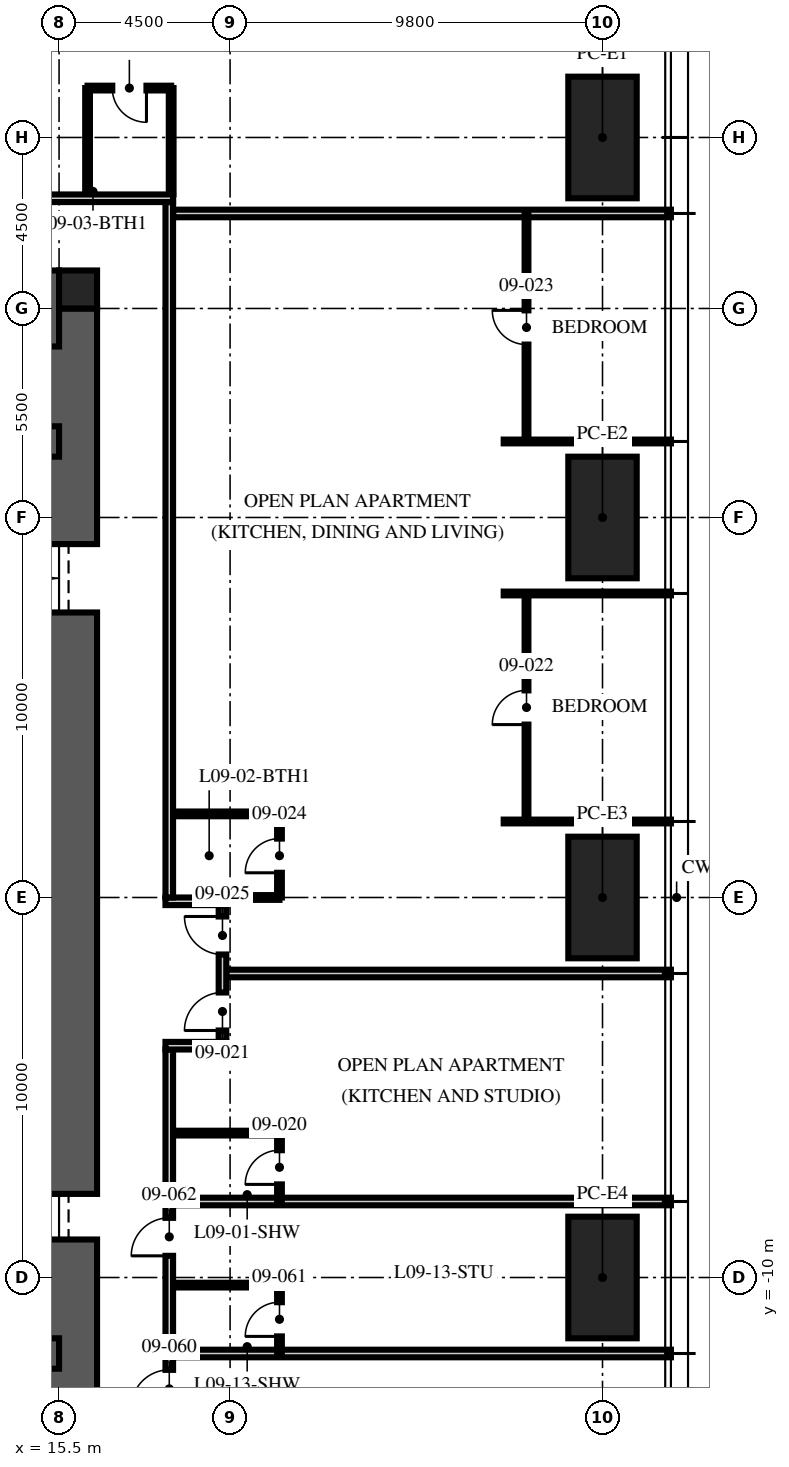
"""IFC4 building model, lengths in metres.
Left out: names, types, materials, properties, quantities, classifications, styles, units other than length and angle.
Written with IfcOpenShell. Run it as: python <this file> out.ifc"""

import sys

from ifc_helpers import new_model, si_unit, direction, frame, frame_2d, origin, origin_2d, place, context, subcontext, project, spatial, rectangle, hollow_rectangle, extrude, element, fill, save


model = new_model("IFC4")
c1 = context("Model", 3, precision=1e-05, world=origin(), true_north=direction((0.0, 1.0)))
c2 = subcontext(c1, "Body", "Model", "MODEL_VIEW")
j1 = project(units=[si_unit("LENGTHUNIT", "METRE"), si_unit("PLANEANGLEUNIT", "RADIAN")], contexts=[c1])
p1 = place(None, origin())
s1 = spatial("IfcSite", under=j1, at=p1, CompositionType="ELEMENT")
p2 = place(p1, origin())
s2 = spatial("IfcBuilding", under=s1, at=p2, CompositionType="ELEMENT")
p3 = place(p2, frame((0.0, 0.0, 39.75)))
s3 = spatial("IfcBuildingStorey", under=s2, at=p3, CompositionType="ELEMENT", Elevation=39.75)
p4 = place(p3, frame((15.5, -15.5, -0.25), z_axis=(0.0, 0.0, 1.0), x_axis=(0.0, 1.0, 0.0)))
e1 = element("IfcWall", 1, at=p4, inside=s3, PredefinedType="SHEAR", context=c2, shape_type="SweptSolid", body=[
    extrude(rectangle(XDim=31.0, YDim=2.0, at=frame_2d((15.5, 0.0))), origin(), (0.0, 0.0, 1.0), 3.75),
])
p5 = place(p4, frame((6.5, 0.0, 0.25)))
e2 = element("IfcOpeningElement", 2, at=p5, cuts=e1, PredefinedType="OPENING", context=c2, shape_type="SweptSolid", body=[
    extrude(rectangle(XDim=1.2, YDim=2.1, at=frame_2d((0.6, 1.05))), frame((0.0, 1.01, 0.0), z_axis=(0.0, -1.0, 0.0), x_axis=(1.0, 0.0, 0.0)), (0.0, 0.0, 1.0), 2.02),
])
p6 = place(p4, frame((23.0, 0.0, 0.25)))
e3 = element("IfcOpeningElement", 3, at=p6, cuts=e1, PredefinedType="OPENING", context=c2, shape_type="SweptSolid", body=[
    extrude(rectangle(XDim=1.8, YDim=2.1, at=frame_2d((0.9, 1.05))), frame((0.0, 1.01, 0.0), z_axis=(0.0, -1.0, 0.0), x_axis=(1.0, 0.0, 0.0)), (0.0, 0.0, 1.0), 2.02),
])
p7 = place(p3, frame((-15.5, 15.5, -0.25), z_axis=(0.0, 0.0, 1.0), x_axis=(1.0, 0.0, 0.0)))
e4 = element("IfcWall", 4, at=p7, inside=s3, PredefinedType="SHEAR", context=c2, shape_type="SweptSolid", body=[
    extrude(rectangle(XDim=31.0, YDim=2.0, at=frame_2d((15.5, 0.0))), origin(), (0.0, 0.0, 1.0), 3.75),
])
p8 = place(p7, frame((10.4, 0.0, 0.25)))
e5 = element("IfcOpeningElement", 5, at=p8, cuts=e4, PredefinedType="OPENING", context=c2, shape_type="SweptSolid", body=[
    extrude(rectangle(XDim=1.1, YDim=2.1, at=frame_2d((0.55, 1.05))), frame((0.0, 1.01, 0.0), z_axis=(0.0, -1.0, 0.0), x_axis=(1.0, 0.0, 0.0)), (0.0, 0.0, 1.0), 2.02),
])
p9 = place(p7, frame((13.5, 0.0, 0.25)))
e6 = element("IfcOpeningElement", 6, at=p9, cuts=e4, PredefinedType="OPENING", context=c2, shape_type="SweptSolid", body=[
    extrude(rectangle(XDim=1.1, YDim=2.1, at=frame_2d((0.55, 1.05))), frame((0.0, 1.01, 0.0), z_axis=(0.0, -1.0, 0.0), x_axis=(1.0, 0.0, 0.0)), (0.0, 0.0, 1.0), 2.02),
])
p10 = place(p7, frame((16.6, 0.0, 0.25)))
e7 = element("IfcOpeningElement", 7, at=p10, cuts=e4, PredefinedType="OPENING", context=c2, shape_type="SweptSolid", body=[
    extrude(rectangle(XDim=1.1, YDim=2.1, at=frame_2d((0.55, 1.05))), frame((0.0, 1.01, 0.0), z_axis=(0.0, -1.0, 0.0), x_axis=(1.0, 0.0, 0.0)), (0.0, 0.0, 1.0), 2.02),
])
for number, where, z_axis, x_axis in (
    (8, (-15.5, 12.0, -0.25), (0.0, 0.0, 1.0), (1.0, 0.0, 0.0)),
    (9, (-15.5, -12.0, -0.25), (0.0, 0.0, 1.0), (1.0, 0.0, 0.0)),
):
    element("IfcWall", number, at=place(p3, frame(where, z_axis=z_axis, x_axis=x_axis)), inside=s3, PredefinedType="SHEAR", context=c2, shape_type="SweptSolid", body=[
        extrude(rectangle(XDim=31.0, YDim=0.8, at=frame_2d((15.5, 0.0))), origin(), (0.0, 0.0, 1.0), 3.75),
    ])
p11 = place(p3, frame((16.0, 16.0, -0.25), z_axis=(0.0, 0.0, 1.0), x_axis=(1.0, 0.0, 0.0)))
e10 = element("IfcColumn", 10, at=p11, inside=s3, PredefinedType="COLUMN", context=c2, shape_type="SweptSolid", body=[
    extrude(rectangle(XDim=1.0, YDim=1.0, at=origin_2d()), origin(), (0.0, 0.0, 1.0), 3.75),
])
for number, where, z_axis, x_axis in (
    (11, (29.8, 20.0, 0.0), (0.0, 0.0, 1.0), (0.0, 1.0, 0.0)),
    (12, (29.8, 10.0, 0.0), (0.0, 0.0, 1.0), (0.0, 1.0, 0.0)),
    (13, (29.8, 0.0, 0.0), (0.0, 0.0, 1.0), (0.0, 1.0, 0.0)),
    (14, (29.8, -10.0, 0.0), (0.0, 0.0, 1.0), (0.0, 1.0, 0.0)),
):
    element("IfcColumn", number, at=place(p3, frame(where, z_axis=z_axis, x_axis=x_axis)), inside=s3, PredefinedType="COLUMN", context=c2, shape_type="SweptSolid", body=[
        extrude(hollow_rectangle(XDim=3.2, YDim=1.8, WallThickness=0.2, at=origin_2d()), origin(), (0.0, 0.0, 1.0), 3.75),
    ])
p12 = place(p3, frame((18.5, -8.0, 0.0), z_axis=(0.0, 0.0, 1.0), x_axis=(1.0, 0.0, 0.0)))
e15 = element("IfcWall", 15, at=p12, inside=s3, PredefinedType="PARTITIONING", context=c2, shape_type="SweptSolid", body=[
    extrude(rectangle(XDim=13.1, YDim=0.2, at=frame_2d((6.55, 0.0))), origin(), (0.0, 0.0, 1.0), 2.71),
])
p13 = place(p3, frame((19.9, -2.0, 0.0), z_axis=(0.0, 0.0, 1.0), x_axis=(1.0, 0.0, 0.0)))
e16 = element("IfcWall", 16, at=p13, inside=s3, PredefinedType="PARTITIONING", context=c2, shape_type="SweptSolid", body=[
    extrude(rectangle(XDim=11.7, YDim=0.2, at=frame_2d((5.85, 0.0))), origin(), (0.0, 0.0, 1.0), 2.71),
])
for number, where, z_axis, x_axis in (
    (17, (27.2, 2.0, 0.0), (0.0, 0.0, 1.0), (1.0, 0.0, 0.0)),
    (18, (27.2, 8.0, 0.0), (0.0, 0.0, 1.0), (1.0, 0.0, 0.0)),
    (19, (27.2, 12.0, 0.0), (0.0, 0.0, 1.0), (1.0, 0.0, 0.0)),
):
    element("IfcWall", number, at=place(p3, frame(where, z_axis=z_axis, x_axis=x_axis)), inside=s3, PredefinedType="PARTITIONING", context=c2, shape_type="SweptSolid", body=[
        extrude(rectangle(XDim=4.4, YDim=0.1, at=frame_2d((2.2, 0.0))), origin(), (0.0, 0.0, 1.0), 2.71),
    ])
p14 = place(p3, frame((18.5, 18.0, 0.0), z_axis=(0.0, 0.0, 1.0), x_axis=(1.0, 0.0, 0.0)))
e20 = element("IfcWall", 20, at=p14, inside=s3, PredefinedType="PARTITIONING", context=c2, shape_type="SweptSolid", body=[
    extrude(rectangle(XDim=13.1, YDim=0.2, at=frame_2d((6.55, 0.0))), origin(), (0.0, 0.0, 1.0), 2.3),
])
p15 = place(p3, frame((18.5, -12.0, 0.0), z_axis=(0.0, 0.0, 1.0), x_axis=(1.0, 0.0, 0.0)))
e21 = element("IfcWall", 21, at=p15, inside=s3, PredefinedType="PARTITIONING", context=c2, shape_type="SweptSolid", body=[
    extrude(rectangle(XDim=13.1, YDim=0.2, at=frame_2d((6.55, 0.0))), origin(), (0.0, 0.0, 1.0), 2.71),
])
p16 = place(p3, frame((21.3, -8.0, 0.0), z_axis=(0.0, 0.0, 1.0), x_axis=(0.0, 1.0, 0.0)))
e22 = element("IfcWall", 22, at=p16, inside=s3, PredefinedType="PARTITIONING", context=c2, shape_type="SweptSolid", body=[
    extrude(rectangle(XDim=1.8, YDim=0.125, at=frame_2d((0.9, 0.0))), origin(), (0.0, 0.0, 1.0), 3.5),
])
p17 = place(p16, frame((0.45, 0.0, 0.0)))
e23 = element("IfcOpeningElement", 23, at=p17, cuts=e22, PredefinedType="OPENING", context=c2, shape_type="SweptSolid", body=[
    extrude(rectangle(XDim=0.9, YDim=2.1, at=frame_2d((0.45, 1.05))), frame((0.0, 0.073, 0.0), z_axis=(0.0, -1.0, 0.0), x_axis=(1.0, 0.0, 0.0)), (0.0, 0.0, 1.0), 0.145),
])
p18 = place(p3, frame((18.5, -6.2, 0.0), z_axis=(0.0, 0.0, 1.0), x_axis=(1.0, 0.0, 0.0)))
e24 = element("IfcWall", 24, at=p18, inside=s3, PredefinedType="PARTITIONING", context=c2, shape_type="SweptSolid", body=[
    extrude(rectangle(XDim=2.8, YDim=0.125, at=frame_2d((1.4, 0.0))), origin(), (0.0, 0.0, 1.0), 3.5),
])
p19 = place(p3, frame((27.8, 2.0, 0.0), z_axis=(0.0, 0.0, 1.0), x_axis=(0.0, 1.0, 0.0)))
e25 = element("IfcWall", 25, at=p19, inside=s3, PredefinedType="PARTITIONING", context=c2, shape_type="SweptSolid", body=[
    extrude(rectangle(XDim=6.0, YDim=0.1, at=frame_2d((3.0, 0.0))), origin(), (0.0, 0.0, 1.0), 2.61),
])
p20 = place(p19, frame((2.55, 0.0, 0.0)))
e26 = element("IfcOpeningElement", 26, at=p20, cuts=e25, PredefinedType="OPENING", context=c2, shape_type="SweptSolid", body=[
    extrude(rectangle(XDim=0.9, YDim=2.1, at=frame_2d((0.45, 1.05))), frame((0.0, 0.06, 0.0), z_axis=(0.0, -1.0, 0.0), x_axis=(1.0, 0.0, 0.0)), (0.0, 0.0, 1.0), 0.12),
])
p21 = place(p3, frame((27.8, 12.0, 0.0), z_axis=(0.0, 0.0, 1.0), x_axis=(0.0, 1.0, 0.0)))
e27 = element("IfcWall", 27, at=p21, inside=s3, PredefinedType="PARTITIONING", context=c2, shape_type="SweptSolid", body=[
    extrude(rectangle(XDim=6.0, YDim=0.1, at=frame_2d((3.0, 0.0))), origin(), (0.0, 0.0, 1.0), 2.61),
])
p22 = place(p21, frame((2.55, 0.0, 0.0)))
e28 = element("IfcOpeningElement", 28, at=p22, cuts=e27, PredefinedType="OPENING", context=c2, shape_type="SweptSolid", body=[
    extrude(rectangle(XDim=0.9, YDim=2.1, at=frame_2d((0.45, 1.05))), frame((0.0, 0.06, 0.0), z_axis=(0.0, -1.0, 0.0), x_axis=(1.0, 0.0, 0.0)), (0.0, 0.0, 1.0), 0.12),
])
p23 = place(p3, frame((21.3, 0.0, 0.0), z_axis=(0.0, 0.0, 1.0), x_axis=(0.0, 1.0, 0.0)))
e29 = element("IfcWall", 29, at=p23, inside=s3, PredefinedType="PARTITIONING", context=c2, shape_type="SweptSolid", body=[
    extrude(rectangle(XDim=2.2, YDim=0.125, at=frame_2d((1.1, 0.0))), origin(), (0.0, 0.0, 1.0), 2.492),
])
p24 = place(p23, frame((0.65, 0.0, 0.0)))
e30 = element("IfcOpeningElement", 30, at=p24, cuts=e29, PredefinedType="OPENING", context=c2, shape_type="SweptSolid", body=[
    extrude(rectangle(XDim=0.9, YDim=2.1, at=frame_2d((0.45, 1.05))), frame((0.0, 0.073, 0.0), z_axis=(0.0, -1.0, 0.0), x_axis=(1.0, 0.0, 0.0)), (0.0, 0.0, 1.0), 0.145),
])
p25 = place(p3, frame((19.97, 0.0, 0.0), z_axis=(0.0, 0.0, 1.0), x_axis=(1.0, 0.0, 0.0)))
e31 = element("IfcWall", 31, at=p25, inside=s3, PredefinedType="PARTITIONING", context=c2, shape_type="SweptSolid", body=[
    extrude(rectangle(XDim=1.33, YDim=0.125, at=frame_2d((0.665, 0.0))), origin(), (0.0, 0.0, 1.0), 2.492),
])
p26 = place(p3, frame((18.5, 2.2, 0.0), z_axis=(0.0, 0.0, 1.0), x_axis=(1.0, 0.0, 0.0)))
e32 = element("IfcWall", 32, at=p26, inside=s3, PredefinedType="PARTITIONING", context=c2, shape_type="SweptSolid", body=[
    extrude(rectangle(XDim=2.8, YDim=0.125, at=frame_2d((1.4, 0.0))), origin(), (0.0, 0.0, 1.0), 3.5),
])
p27 = place(p3, frame((18.45, 21.3, 0.0), z_axis=(0.0, 0.0, 1.0), x_axis=(-1.0, 0.0, 0.0)))
e33 = element("IfcWall", 33, at=p27, inside=s3, PredefinedType="PARTITIONING", context=c2, shape_type="SweptSolid", body=[
    extrude(rectangle(XDim=2.2, YDim=0.125, at=frame_2d((1.1, 0.0))), origin(), (0.0, 0.0, 1.0), 3.5),
])
p28 = place(p27, frame((0.65, 0.0, 0.0)))
e34 = element("IfcOpeningElement", 34, at=p28, cuts=e33, PredefinedType="OPENING", context=c2, shape_type="SweptSolid", body=[
    extrude(rectangle(XDim=0.9, YDim=2.1, at=frame_2d((0.45, 1.05))), frame((0.0, 0.073, 0.0), z_axis=(0.0, -1.0, 0.0), x_axis=(1.0, 0.0, 0.0)), (0.0, 0.0, 1.0), 0.145),
])
p29 = place(p3, frame((18.45, 18.5, 0.0), z_axis=(0.0, 0.0, 1.0), x_axis=(0.0, 1.0, 0.0)))
e35 = element("IfcWall", 35, at=p29, inside=s3, PredefinedType="PARTITIONING", context=c2, shape_type="SweptSolid", body=[
    extrude(rectangle(XDim=2.8, YDim=0.125, at=frame_2d((1.4, 0.0))), origin(), (0.0, 0.0, 1.0), 2.3),
])
p30 = place(p3, frame((16.25, 18.5, 0.0), z_axis=(0.0, 0.0, 1.0), x_axis=(0.0, 1.0, 0.0)))
e36 = element("IfcWall", 36, at=p30, inside=s3, PredefinedType="PARTITIONING", context=c2, shape_type="SweptSolid", body=[
    extrude(rectangle(XDim=2.8, YDim=0.125, at=frame_2d((1.4, 0.0))), origin(), (0.0, 0.0, 1.0), 3.5),
])
p31 = place(p3, frame((21.3, -12.0, 0.0), z_axis=(0.0, 0.0, 1.0), x_axis=(0.0, 1.0, 0.0)))
e37 = element("IfcWall", 37, at=p31, inside=s3, PredefinedType="PARTITIONING", context=c2, shape_type="SweptSolid", body=[
    extrude(rectangle(XDim=1.8, YDim=0.125, at=frame_2d((0.9, 0.0))), origin(), (0.0, 0.0, 1.0), 3.5),
])
p32 = place(p31, frame((0.45, 0.0, 0.0)))
e38 = element("IfcOpeningElement", 38, at=p32, cuts=e37, PredefinedType="OPENING", context=c2, shape_type="SweptSolid", body=[
    extrude(rectangle(XDim=0.9, YDim=2.1, at=frame_2d((0.45, 1.05))), frame((0.0, 0.073, 0.0), z_axis=(0.0, -1.0, 0.0), x_axis=(1.0, 0.0, 0.0)), (0.0, 0.0, 1.0), 0.145),
])
p33 = place(p3, frame((18.5, -10.2, 0.0), z_axis=(0.0, 0.0, 1.0), x_axis=(1.0, 0.0, 0.0)))
e39 = element("IfcWall", 39, at=p33, inside=s3, PredefinedType="PARTITIONING", context=c2, shape_type="SweptSolid", body=[
    extrude(rectangle(XDim=2.8, YDim=0.125, at=frame_2d((1.4, 0.0))), origin(), (0.0, 0.0, 1.0), 2.492),
])
p34 = place(p3, frame((18.4, -18.3, 0.0), z_axis=(0.0, 0.0, 1.0), x_axis=(0.0, 1.0, 0.0)))
e40 = element("IfcWall", 40, at=p34, inside=s3, PredefinedType="PARTITIONING", context=c2, shape_type="SweptSolid", body=[
    extrude(rectangle(XDim=14.3, YDim=0.2, at=frame_2d((7.15, 0.0))), origin(), (0.0, 0.0, 1.0), 2.3),
])
p35 = place(p34, frame((4.87, 0.0, 0.0)))
e41 = element("IfcOpeningElement", 41, at=p35, cuts=e40, PredefinedType="OPENING", context=c2, shape_type="SweptSolid", body=[
    extrude(rectangle(XDim=1.0, YDim=2.2, at=frame_2d((0.5, 1.1))), frame((0.0, 0.11, 0.0), z_axis=(0.0, -1.0, 0.0), x_axis=(1.0, 0.0, 0.0)), (0.0, 0.0, 1.0), 0.22),
])
p36 = place(p34, frame((8.87, 0.0, 0.0)))
e42 = element("IfcOpeningElement", 42, at=p36, cuts=e40, PredefinedType="OPENING", context=c2, shape_type="SweptSolid", body=[
    extrude(rectangle(XDim=1.0, YDim=2.2, at=frame_2d((0.5, 1.1))), frame((0.0, 0.11, 0.0), z_axis=(0.0, -1.0, 0.0), x_axis=(1.0, 0.0, 0.0)), (0.0, 0.0, 1.0), 0.22),
])
p37 = place(p3, frame((18.3, -3.9, 0.0), z_axis=(0.0, 0.0, 1.0), x_axis=(1.0, 0.0, 0.0)))
e43 = element("IfcWall", 43, at=p37, inside=s3, PredefinedType="PARTITIONING", context=c2, shape_type="SweptSolid", body=[
    extrude(rectangle(XDim=1.6, YDim=0.2, at=frame_2d((0.8, 0.0))), origin(), (0.0, 0.0, 1.0), 3.5),
])
p38 = place(p3, frame((18.3, -0.1, 0.0), z_axis=(0.0, 0.0, 1.0), x_axis=(1.0, 0.0, 0.0)))
e44 = element("IfcWall", 44, at=p38, inside=s3, PredefinedType="PARTITIONING", context=c2, shape_type="SweptSolid", body=[
    extrude(rectangle(XDim=1.6, YDim=0.2, at=frame_2d((0.8, 0.0))), origin(), (0.0, 0.0, 1.0), 2.492),
])
p39 = place(p3, frame((19.8, -3.8, 0.0), z_axis=(0.0, 0.0, 1.0), x_axis=(0.0, 1.0, 0.0)))
e45 = element("IfcWall", 45, at=p39, inside=s3, PredefinedType="PARTITIONING", context=c2, shape_type="SweptSolid", body=[
    extrude(rectangle(XDim=3.6, YDim=0.2, at=frame_2d((1.8, 0.0))), origin(), (0.0, 0.0, 1.0), 3.5),
])
p40 = place(p39, frame((0.3, 0.0, 0.0)))
e46 = element("IfcOpeningElement", 46, at=p40, cuts=e45, PredefinedType="OPENING", context=c2, shape_type="SweptSolid", body=[
    extrude(rectangle(XDim=1.0, YDim=2.2, at=frame_2d((0.5, 1.1))), frame((0.0, 0.11, 0.0), z_axis=(0.0, -1.0, 0.0), x_axis=(1.0, 0.0, 0.0)), (0.0, 0.0, 1.0), 0.22),
])
p41 = place(p39, frame((2.3, 0.0, 0.0)))
e47 = element("IfcOpeningElement", 47, at=p41, cuts=e45, PredefinedType="OPENING", context=c2, shape_type="SweptSolid", body=[
    extrude(rectangle(XDim=1.0, YDim=2.2, at=frame_2d((0.5, 1.1))), frame((0.0, 0.11, 0.0), z_axis=(0.0, -1.0, 0.0), x_axis=(1.0, 0.0, 0.0)), (0.0, 0.0, 1.0), 0.22),
])
p42 = place(p3, frame((18.4, 0.0, 0.0), z_axis=(0.0, 0.0, 1.0), x_axis=(0.0, 1.0, 0.0)))
e48 = element("IfcWall", 48, at=p42, inside=s3, PredefinedType="PARTITIONING", context=c2, shape_type="SweptSolid", body=[
    extrude(rectangle(XDim=18.3, YDim=0.2, at=frame_2d((9.15, 0.0))), origin(), (0.0, 0.0, 1.0), 2.3),
])
p43 = place(p3, frame((10.0, 18.4, 0.0), z_axis=(0.0, 0.0, 1.0), x_axis=(1.0, 0.0, 0.0)))
e49 = element("IfcWall", 49, at=p43, inside=s3, PredefinedType="PARTITIONING", context=c2, shape_type="SweptSolid", body=[
    extrude(rectangle(XDim=8.5, YDim=0.2, at=frame_2d((4.25, 0.0))), origin(), (0.0, 0.0, 1.0), 2.3),
])
p44 = place(p5, origin())
e50 = element("IfcDoor", 50, at=p44, inside=s3, OperationType="SINGLE_SWING_LEFT", PredefinedType="DOOR", context=c2, shape_type="SweptSolid", body=[
    extrude(rectangle(XDim=1.2, YDim=2.1, at=frame_2d((0.6, 1.05))), frame((0.0, 0.025, 0.0), z_axis=(0.0, -1.0, 0.0), x_axis=(1.0, 0.0, 0.0)), (0.0, 0.0, 1.0), 0.05),
])
fill(e2, e50)
p45 = place(p6, origin())
e51 = element("IfcDoor", 51, at=p45, inside=s3, OperationType="DOUBLE_DOOR_SINGLE_SWING", PredefinedType="DOOR", context=c2, shape_type="SweptSolid", body=[
    extrude(rectangle(XDim=1.8, YDim=2.1, at=frame_2d((0.9, 1.05))), frame((0.0, 0.025, 0.0), z_axis=(0.0, -1.0, 0.0), x_axis=(1.0, 0.0, 0.0)), (0.0, 0.0, 1.0), 0.05),
])
fill(e3, e51)
p46 = place(p17, origin())
e52 = element("IfcDoor", 52, at=p46, inside=s3, OperationType="SINGLE_SWING_LEFT", PredefinedType="DOOR", context=c2, shape_type="SweptSolid", body=[
    extrude(rectangle(XDim=0.9, YDim=2.1, at=frame_2d((0.45, 1.05))), frame((0.0, 0.025, 0.0), z_axis=(0.0, -1.0, 0.0), x_axis=(1.0, 0.0, 0.0)), (0.0, 0.0, 1.0), 0.05),
])
fill(e23, e52)
p47 = place(p40, origin())
e53 = element("IfcDoor", 53, at=p47, inside=s3, OperationType="SINGLE_SWING_LEFT", PredefinedType="DOOR", context=c2, shape_type="SweptSolid", body=[
    extrude(rectangle(XDim=1.0, YDim=2.2, at=frame_2d((0.5, 1.1))), frame((0.0, 0.025, 0.0), z_axis=(0.0, -1.0, 0.0), x_axis=(1.0, 0.0, 0.0)), (0.0, 0.0, 1.0), 0.05),
])
fill(e46, e53)
p48 = place(p20, origin())
e54 = element("IfcDoor", 54, at=p48, inside=s3, OperationType="SINGLE_SWING_LEFT", PredefinedType="DOOR", context=c2, shape_type="SweptSolid", body=[
    extrude(rectangle(XDim=0.9, YDim=2.1, at=frame_2d((0.45, 1.05))), frame((0.0, 0.025, 0.0), z_axis=(0.0, -1.0, 0.0), x_axis=(1.0, 0.0, 0.0)), (0.0, 0.0, 1.0), 0.05),
])
fill(e26, e54)
p49 = place(p22, origin())
e55 = element("IfcDoor", 55, at=p49, inside=s3, OperationType="SINGLE_SWING_RIGHT", PredefinedType="DOOR", context=c2, shape_type="SweptSolid", body=[
    extrude(rectangle(XDim=0.9, YDim=2.1, at=frame_2d((0.45, 1.05))), frame((0.0, 0.025, 0.0), z_axis=(0.0, -1.0, 0.0), x_axis=(1.0, 0.0, 0.0)), (0.0, 0.0, 1.0), 0.05),
])
fill(e28, e55)
p50 = place(p24, origin())
e56 = element("IfcDoor", 56, at=p50, inside=s3, OperationType="SINGLE_SWING_LEFT", PredefinedType="DOOR", context=c2, shape_type="SweptSolid", body=[
    extrude(rectangle(XDim=0.9, YDim=2.1, at=frame_2d((0.45, 1.05))), frame((0.0, 0.025, 0.0), z_axis=(0.0, -1.0, 0.0), x_axis=(1.0, 0.0, 0.0)), (0.0, 0.0, 1.0), 0.05),
])
fill(e30, e56)
p51 = place(p41, origin())
e57 = element("IfcDoor", 57, at=p51, inside=s3, OperationType="SINGLE_SWING_RIGHT", PredefinedType="DOOR", context=c2, shape_type="SweptSolid", body=[
    extrude(rectangle(XDim=1.0, YDim=2.2, at=frame_2d((0.5, 1.1))), frame((0.0, 0.025, 0.0), z_axis=(0.0, -1.0, 0.0), x_axis=(1.0, 0.0, 0.0)), (0.0, 0.0, 1.0), 0.05),
])
fill(e47, e57)
p52 = place(p28, origin())
e58 = element("IfcDoor", 58, at=p52, inside=s3, OperationType="SINGLE_SWING_LEFT", PredefinedType="DOOR", context=c2, shape_type="SweptSolid", body=[
    extrude(rectangle(XDim=0.9, YDim=2.1, at=frame_2d((0.45, 1.05))), frame((0.0, 0.025, 0.0), z_axis=(0.0, -1.0, 0.0), x_axis=(1.0, 0.0, 0.0)), (0.0, 0.0, 1.0), 0.05),
])
fill(e34, e58)
p53 = place(p35, origin())
e59 = element("IfcDoor", 59, at=p53, inside=s3, OperationType="SINGLE_SWING_LEFT", PredefinedType="DOOR", context=c2, shape_type="SweptSolid", body=[
    extrude(rectangle(XDim=1.0, YDim=2.2, at=frame_2d((0.5, 1.1))), frame((0.0, 0.025, 0.0), z_axis=(0.0, -1.0, 0.0), x_axis=(1.0, 0.0, 0.0)), (0.0, 0.0, 1.0), 0.05),
])
fill(e41, e59)
p54 = place(p32, origin())
e60 = element("IfcDoor", 60, at=p54, inside=s3, OperationType="SINGLE_SWING_LEFT", PredefinedType="DOOR", context=c2, shape_type="SweptSolid", body=[
    extrude(rectangle(XDim=0.9, YDim=2.1, at=frame_2d((0.45, 1.05))), frame((0.0, 0.025, 0.0), z_axis=(0.0, -1.0, 0.0), x_axis=(1.0, 0.0, 0.0)), (0.0, 0.0, 1.0), 0.05),
])
fill(e38, e60)
p55 = place(p36, origin())
e61 = element("IfcDoor", 61, at=p55, inside=s3, OperationType="SINGLE_SWING_LEFT", PredefinedType="DOOR", context=c2, shape_type="SweptSolid", body=[
    extrude(rectangle(XDim=1.0, YDim=2.2, at=frame_2d((0.5, 1.1))), frame((0.0, 0.025, 0.0), z_axis=(0.0, -1.0, 0.0), x_axis=(1.0, 0.0, 0.0)), (0.0, 0.0, 1.0), 0.05),
])
fill(e42, e61)
save(model, sys.argv[1])
